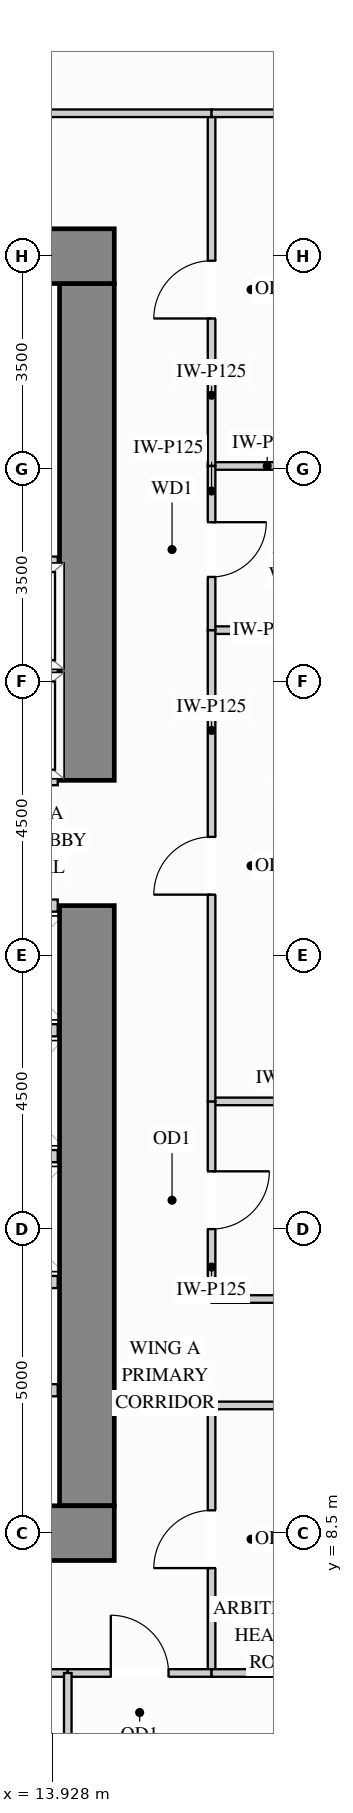
"""IFC4 building model, lengths in metres.
Left out: names, types, materials, properties, quantities, classifications, styles, units other than length and angle.
Written with IfcOpenShell. Run it as: python <this file> out.ifc"""

import sys

from ifc_helpers import new_model, si_unit, direction, frame, frame_2d, origin, place, context, subcontext, project, spatial, rectangle, extrude, source, transform, mapped, element, fill, save


model = new_model("IFC4")
c1 = context("Model", 3, precision=1e-05, world=origin(), true_north=direction((0.0, 1.0)))
c2 = subcontext(c1, "Body", "Model", "MODEL_VIEW")
j1 = project(units=[si_unit("LENGTHUNIT", "METRE"), si_unit("PLANEANGLEUNIT", "RADIAN")], contexts=[c1])
p1 = place(None, origin())
s1 = spatial("IfcSite", under=j1, at=p1, CompositionType="ELEMENT")
p2 = place(p1, origin())
s2 = spatial("IfcBuilding", under=s1, at=p2, CompositionType="ELEMENT")
p3 = place(p2, frame((0.0, 0.0, 69.3)))
s3 = spatial("IfcBuildingStorey", under=s2, at=p3, CompositionType="ELEMENT", Elevation=69.3)
m1 = source(origin(), c2, "Body", "SweptSolid", [
    extrude(rectangle(XDim=9.87, YDim=0.9, at=frame_2d((4.935, 0.0))), origin(), (0.0, 0.0, 1.0), 3.32),
])
p4 = place(p3, frame((14.5, 8.95, 0.0), z_axis=(0.0, 0.0, 1.0), x_axis=(0.0, 1.0, 0.0)))
e1 = element("IfcWall", 1, at=p4, inside=s3, PredefinedType="SHEAR", context=c2, shape_type="MappedRepresentation", body=[
    mapped(m1, transform((0.0, 0.0, 0.0), x_axis=(1.0, 0.0, 0.0), y_axis=(0.0, 1.0, 0.0), z_axis=(0.0, 0.0, 1.0))),
])
m2 = source(origin(), c2, "Body", "SweptSolid", [
    extrude(rectangle(XDim=8.17, YDim=0.9, at=frame_2d((4.085, 0.0))), origin(), (0.0, 0.0, 1.0), 3.32),
])
p5 = place(p3, frame((14.5, 20.88, 0.0), z_axis=(0.0, 0.0, 1.0), x_axis=(0.0, 1.0, 0.0)))
e2 = element("IfcWall", 2, at=p5, inside=s3, PredefinedType="SHEAR", context=c2, shape_type="MappedRepresentation", body=[
    mapped(m2, transform((0.0, 0.0, 0.0), x_axis=(1.0, 0.0, 0.0), y_axis=(0.0, 1.0, 0.0), z_axis=(0.0, 0.0, 1.0))),
])
m3 = source(origin(), c2, "Body", "SweptSolid", [
    extrude(rectangle(XDim=10.9, YDim=0.9, at=frame_2d((5.45, 0.0))), origin(), (0.0, 0.0, 1.0), 3.32),
])
for number, where, z_axis, x_axis in (
    (3, (4.05, 29.5, 0.0), (0.0, 0.0, 1.0), (1.0, 0.0, 0.0)),
    (4, (4.05, 8.5, 0.0), (0.0, 0.0, 1.0), (1.0, 0.0, 0.0)),
):
    element("IfcWall", number, at=place(p3, frame(where, z_axis=z_axis, x_axis=x_axis)), inside=s3, PredefinedType="SHEAR", context=c2, shape_type="MappedRepresentation", body=[
        mapped(m3, transform((0.0, 0.0, 0.0), x_axis=(1.0, 0.0, 0.0), y_axis=(0.0, 1.0, 0.0), z_axis=(0.0, 0.0, 1.0))),
    ])
m4 = source(origin(), c2, "Body", "SweptSolid", [
    extrude(rectangle(XDim=2.6, YDim=0.125, at=frame_2d((1.3, 0.0))), origin(), (0.0, 0.0, 1.0), 3.305),
])
p6 = place(p3, frame((16.55, 15.6, 0.0), z_axis=(0.0, 0.0, 1.0), x_axis=(1.0, 0.0, 0.0)))
e5 = element("IfcWall", 5, at=p6, inside=s3, PredefinedType="PARTITIONING", context=c2, shape_type="MappedRepresentation", body=[
    mapped(m4, transform((0.0, 0.0, 0.0), x_axis=(1.0, 0.0, 0.0), y_axis=(0.0, 1.0, 0.0), z_axis=(0.0, 0.0, 1.0))),
])
m5 = source(origin(), c2, "Body", "SweptSolid", [
    extrude(rectangle(XDim=2.598, YDim=0.125, at=frame_2d((1.299, 0.0))), origin(), (0.0, 0.0, 1.0), 3.305),
])
for number, where, z_axis, x_axis in (
    (6, (16.55, 23.35, 0.0), (0.0, 0.0, 1.0), (1.0, 0.0, 0.0)),
    (7, (16.55, 26.05, 0.0), (0.0, 0.0, 1.0), (1.0, 0.0, 0.0)),
):
    element("IfcWall", number, at=place(p3, frame(where, z_axis=z_axis, x_axis=x_axis)), inside=s3, PredefinedType="PARTITIONING", context=c2, shape_type="MappedRepresentation", body=[
        mapped(m5, transform((0.0, 0.0, 0.0), x_axis=(1.0, 0.0, 0.0), y_axis=(0.0, 1.0, 0.0), z_axis=(0.0, 0.0, 1.0))),
    ])
p7 = place(p3, frame((16.55, 12.35, 0.0), z_axis=(0.0, 0.0, 1.0), x_axis=(0.0, 1.0, 0.0)))
e8 = element("IfcWall", 8, at=p7, inside=s3, PredefinedType="PARTITIONING", context=c2, shape_type="SweptSolid", body=[
    extrude(rectangle(XDim=3.25, YDim=0.125, at=frame_2d((1.625, 0.0))), origin(), (0.0, 0.0, 1.0), 3.305),
])
p8 = place(p7, frame((1.15, 0.0, 0.0)))
e9 = element("IfcOpeningElement", 9, at=p8, cuts=e8, PredefinedType="OPENING", context=c2, shape_type="SweptSolid", body=[
    extrude(rectangle(XDim=0.95, YDim=2.15, at=frame_2d((0.475, 1.075))), frame((0.0, 0.073, 0.0), z_axis=(0.0, -1.0, 0.0), x_axis=(1.0, 0.0, 0.0)), (0.0, 0.0, 1.0), 0.145),
])
p9 = place(p3, frame((16.55, 15.6, 0.0), z_axis=(0.0, 0.0, 1.0), x_axis=(0.0, 1.0, 0.0)))
e10 = element("IfcWall", 10, at=p9, inside=s3, PredefinedType="PARTITIONING", context=c2, shape_type="SweptSolid", body=[
    extrude(rectangle(XDim=7.75, YDim=0.125, at=frame_2d((3.875, 0.0))), origin(), (0.0, 0.0, 1.0), 3.305),
])
p10 = place(p9, frame((3.4, 0.0, 0.0)))
e11 = element("IfcOpeningElement", 11, at=p10, cuts=e10, PredefinedType="OPENING", context=c2, shape_type="SweptSolid", body=[
    extrude(rectangle(XDim=0.95, YDim=2.15, at=frame_2d((0.475, 1.075))), frame((0.0, 0.073, 0.0), z_axis=(0.0, -1.0, 0.0), x_axis=(1.0, 0.0, 0.0)), (0.0, 0.0, 1.0), 0.145),
])
p11 = place(p3, frame((16.55, 26.05, 0.0), z_axis=(0.0, 0.0, 1.0), x_axis=(0.0, 1.0, 0.0)))
e12 = element("IfcWall", 12, at=p11, inside=s3, PredefinedType="PARTITIONING", context=c2, shape_type="SweptSolid", body=[
    extrude(rectangle(XDim=5.8, YDim=0.125, at=frame_2d((2.9, 0.0))), origin(), (0.0, 0.0, 1.0), 3.305),
])
p12 = place(p11, frame((2.425, 0.0, 0.0)))
e13 = element("IfcOpeningElement", 13, at=p12, cuts=e12, PredefinedType="OPENING", context=c2, shape_type="SweptSolid", body=[
    extrude(rectangle(XDim=0.95, YDim=2.15, at=frame_2d((0.475, 1.075))), frame((0.0, 0.073, 0.0), z_axis=(0.0, -1.0, 0.0), x_axis=(1.0, 0.0, 0.0)), (0.0, 0.0, 1.0), 0.145),
])
p13 = place(p3, frame((16.55, 6.2, 0.0), z_axis=(0.0, 0.0, 1.0), x_axis=(0.0, 1.0, 0.0)))
e14 = element("IfcWall", 14, at=p13, inside=s3, PredefinedType="PARTITIONING", context=c2, shape_type="SweptSolid", body=[
    extrude(rectangle(XDim=4.4, YDim=0.125, at=frame_2d((2.2, 0.0))), origin(), (0.0, 0.0, 1.0), 3.305),
])
p14 = place(p13, frame((1.725, 0.0, 0.0)))
e15 = element("IfcOpeningElement", 15, at=p14, cuts=e14, PredefinedType="OPENING", context=c2, shape_type="SweptSolid", body=[
    extrude(rectangle(XDim=0.95, YDim=2.15, at=frame_2d((0.475, 1.075))), frame((0.0, 0.073, 0.0), z_axis=(0.0, -1.0, 0.0), x_axis=(1.0, 0.0, 0.0)), (0.0, 0.0, 1.0), 0.145),
])
p15 = place(p3, frame((16.55, 23.35, 0.0), z_axis=(0.0, 0.0, 1.0), x_axis=(0.0, 1.0, 0.0)))
e16 = element("IfcWall", 16, at=p15, inside=s3, PredefinedType="PARTITIONING", context=c2, shape_type="SweptSolid", body=[
    extrude(rectangle(XDim=2.7, YDim=0.125, at=frame_2d((1.35, 0.0))), origin(), (0.0, 0.0, 1.0), 3.305),
])
p16 = place(p15, frame((0.875, 0.0, 0.0)))
e17 = element("IfcOpeningElement", 17, at=p16, cuts=e16, PredefinedType="OPENING", context=c2, shape_type="SweptSolid", body=[
    extrude(rectangle(XDim=0.9, YDim=2.15, at=frame_2d((0.45, 1.075))), frame((0.0, 0.073, 0.0), z_axis=(0.0, -1.0, 0.0), x_axis=(1.0, 0.0, 0.0)), (0.0, 0.0, 1.0), 0.145),
])
p17 = place(p3, frame((2.45, 31.85, 0.0), z_axis=(0.0, 0.0, 1.0), x_axis=(1.0, 0.0, 0.0)))
e18 = element("IfcWall", 18, at=p17, inside=s3, PredefinedType="PARTITIONING", context=c2, shape_type="SweptSolid", body=[
    extrude(rectangle(XDim=14.1, YDim=0.125, at=frame_2d((7.05, 0.0))), origin(), (0.0, 0.0, 1.0), 2.768),
])
p18 = place(p17, frame((6.575, 0.0, 0.0)))
e19 = element("IfcOpeningElement", 19, at=p18, cuts=e18, PredefinedType="OPENING", context=c2, shape_type="SweptSolid", body=[
    extrude(rectangle(XDim=0.95, YDim=2.15, at=frame_2d((0.475, 1.075))), frame((0.0, 0.073, 0.0), z_axis=(0.0, -1.0, 0.0), x_axis=(1.0, 0.0, 0.0)), (0.0, 0.0, 1.0), 0.145),
])
m6 = source(origin(), c2, "Body", "SweptSolid", [
    extrude(rectangle(XDim=2.598, YDim=0.125, at=frame_2d((1.299, 0.0))), origin(), (0.0, 0.0, 1.0), 2.768),
])
p19 = place(p3, frame((16.55, 31.85, 0.0), z_axis=(0.0, 0.0, 1.0), x_axis=(1.0, 0.0, 0.0)))
e20 = element("IfcWall", 20, at=p19, inside=s3, PredefinedType="PARTITIONING", context=c2, shape_type="MappedRepresentation", body=[
    mapped(m6, transform((0.0, 0.0, 0.0), x_axis=(1.0, 0.0, 0.0), y_axis=(0.0, 1.0, 0.0), z_axis=(0.0, 0.0, 1.0))),
])
m7 = source(origin(), c2, "Body", "SweptSolid", [
    extrude(rectangle(XDim=2.95, YDim=0.125, at=frame_2d((1.475, 0.0))), origin(), (0.0, 0.0, 1.0), 3.305),
])
for number, where, z_axis, x_axis in (
    (21, (16.55, 12.35, 0.0), (0.0, 0.0, 1.0), (1.0, 0.0, 0.0)),
    (22, (16.55, 10.6, 0.0), (0.0, 0.0, 1.0), (1.0, 0.0, 0.0)),
):
    element("IfcWall", number, at=place(p3, frame(where, z_axis=z_axis, x_axis=x_axis)), inside=s3, PredefinedType="PARTITIONING", context=c2, shape_type="MappedRepresentation", body=[
        mapped(m7, transform((0.0, 0.0, 0.0), x_axis=(1.0, 0.0, 0.0), y_axis=(0.0, 1.0, 0.0), z_axis=(0.0, 0.0, 1.0))),
    ])
p20 = place(p3, frame((10.544, 6.2, 0.0), z_axis=(0.0, 0.0, 1.0), x_axis=(1.0, 0.0, 0.0)))
e23 = element("IfcWall", 23, at=p20, inside=s3, PredefinedType="PARTITIONING", context=c2, shape_type="SweptSolid", body=[
    extrude(rectangle(XDim=3.641, YDim=0.125, at=frame_2d((1.821, 0.0))), origin(), (0.0, 0.0, 1.0), 2.768),
])
p21 = place(p20, frame((1.345, 0.0, 0.0)))
e24 = element("IfcOpeningElement", 24, at=p21, cuts=e23, PredefinedType="OPENING", context=c2, shape_type="SweptSolid", body=[
    extrude(rectangle(XDim=0.95, YDim=2.15, at=frame_2d((0.475, 1.075))), frame((0.0, 0.073, 0.0), z_axis=(0.0, -1.0, 0.0), x_axis=(1.0, 0.0, 0.0)), (0.0, 0.0, 1.0), 0.145),
])
p22 = place(p3, frame((14.185, 6.2, 0.0), z_axis=(0.0, 0.0, 1.0), x_axis=(1.0, 0.0, 0.0)))
e25 = element("IfcWall", 25, at=p22, inside=s3, PredefinedType="PARTITIONING", context=c2, shape_type="SweptSolid", body=[
    extrude(rectangle(XDim=2.365, YDim=0.125, at=frame_2d((1.183, 0.0))), origin(), (0.0, 0.0, 1.0), 2.768),
])
p23 = place(p22, frame((0.708, 0.0, 0.0)))
e26 = element("IfcOpeningElement", 26, at=p23, cuts=e25, PredefinedType="OPENING", context=c2, shape_type="SweptSolid", body=[
    extrude(rectangle(XDim=0.95, YDim=2.15, at=frame_2d((0.475, 1.075))), frame((0.0, 0.073, 0.0), z_axis=(0.0, -1.0, 0.0), x_axis=(1.0, 0.0, 0.0)), (0.0, 0.0, 1.0), 0.145),
])
p24 = place(p3, frame((16.55, 6.2, 0.0), z_axis=(0.0, 0.0, 1.0), x_axis=(1.0, 0.0, 0.0)))
e27 = element("IfcWall", 27, at=p24, inside=s3, PredefinedType="PARTITIONING", context=c2, shape_type="MappedRepresentation", body=[
    mapped(m6, transform((0.0, 0.0, 0.0), x_axis=(1.0, 0.0, 0.0), y_axis=(0.0, 1.0, 0.0), z_axis=(0.0, 0.0, 1.0))),
])
m8 = source(origin(), c2, "Body", "SweptSolid", [
    extrude(rectangle(XDim=4.94, YDim=0.125, at=frame_2d((2.47, 0.0))), origin(), (0.0, 0.0, 1.0), 3.305),
])
p25 = place(p3, frame((14.185, 1.26, 0.0), z_axis=(0.0, 0.0, 1.0), x_axis=(0.0, 1.0, 0.0)))
e28 = element("IfcWall", 28, at=p25, inside=s3, PredefinedType="PARTITIONING", context=c2, shape_type="MappedRepresentation", body=[
    mapped(m8, transform((0.0, 0.0, 0.0), x_axis=(1.0, 0.0, 0.0), y_axis=(0.0, 1.0, 0.0), z_axis=(0.0, 0.0, 1.0))),
])
m9 = source(origin(), c2, "Body", "SweptSolid", [
    extrude(rectangle(XDim=1.6, YDim=0.2, at=frame_2d((0.8, 0.0))), origin(), (0.0, 0.0, 1.0), 3.305),
])
p26 = place(p3, frame((12.42, 10.85, 0.0), z_axis=(0.0, 0.0, 1.0), x_axis=(1.0, 0.0, 0.0)))
e29 = element("IfcWall", 29, at=p26, inside=s3, PredefinedType="PARTITIONING", context=c2, shape_type="MappedRepresentation", body=[
    mapped(m9, transform((0.0, 0.0, 0.0), x_axis=(1.0, 0.0, 0.0), y_axis=(0.0, 1.0, 0.0), z_axis=(0.0, 0.0, 1.0))),
])
m10 = source(origin(), c2, "Body", "SweptSolid", [
    extrude(rectangle(XDim=2.19, YDim=0.2, at=frame_2d((1.095, 0.0))), origin(), (0.0, 0.0, 1.0), 3.305),
])
for number, where, z_axis, x_axis in (
    (30, (11.83, 22.66, 0.0), (0.0, 0.0, 1.0), (1.0, 0.0, 0.0)),
    (31, (11.83, 20.9, 0.0), (0.0, 0.0, 1.0), (1.0, 0.0, 0.0)),
    (32, (11.83, 24.46, 0.0), (0.0, 0.0, 1.0), (1.0, 0.0, 0.0)),
):
    element("IfcWall", number, at=place(p3, frame(where, z_axis=z_axis, x_axis=x_axis)), inside=s3, PredefinedType="PARTITIONING", context=c2, shape_type="MappedRepresentation", body=[
        mapped(m10, transform((0.0, 0.0, 0.0), x_axis=(1.0, 0.0, 0.0), y_axis=(0.0, 1.0, 0.0), z_axis=(0.0, 0.0, 1.0))),
    ])
m11 = source(origin(), c2, "Body", "SweptSolid", [
    extrude(rectangle(XDim=1.79, YDim=0.2, at=frame_2d((0.895, 0.0))), origin(), (0.0, 0.0, 1.0), 3.305),
])
for number, where, z_axis, x_axis in (
    (33, (12.23, 14.7, 0.0), (0.0, 0.0, 1.0), (1.0, 0.0, 0.0)),
    (34, (12.23, 12.63, 0.0), (0.0, 0.0, 1.0), (1.0, 0.0, 0.0)),
    (35, (12.23, 16.77, 0.0), (0.0, 0.0, 1.0), (1.0, 0.0, 0.0)),
    (36, (12.23, 18.82, 0.0), (0.0, 0.0, 1.0), (1.0, 0.0, 0.0)),
):
    element("IfcWall", number, at=place(p3, frame(where, z_axis=z_axis, x_axis=x_axis)), inside=s3, PredefinedType="PARTITIONING", context=c2, shape_type="MappedRepresentation", body=[
        mapped(m11, transform((0.0, 0.0, 0.0), x_axis=(1.0, 0.0, 0.0), y_axis=(0.0, 1.0, 0.0), z_axis=(0.0, 0.0, 1.0))),
    ])
m12 = source(origin(), c2, "Body", "SweptSolid", [
    extrude(rectangle(XDim=0.95, YDim=2.15, at=frame_2d((0.475, 1.075))), frame((0.0, 0.025, 0.0), z_axis=(0.0, -1.0, 0.0), x_axis=(1.0, 0.0, 0.0)), (0.0, 0.0, 1.0), 0.05),
])
p27 = place(p14, origin())
e37 = element("IfcDoor", 37, at=p27, inside=s3, OperationType="SINGLE_SWING_LEFT", PredefinedType="DOOR", context=c2, shape_type="MappedRepresentation", body=[
    mapped(m12, transform((0.0, 0.0, 0.0), x_axis=(1.0, 0.0, 0.0), y_axis=(0.0, 1.0, 0.0), z_axis=(0.0, 0.0, 1.0))),
])
fill(e15, e37)
p28 = place(p8, origin())
e38 = element("IfcDoor", 38, at=p28, inside=s3, OperationType="SINGLE_SWING_RIGHT", PredefinedType="DOOR", context=c2, shape_type="MappedRepresentation", body=[
    mapped(m12, transform((0.0, 0.0, 0.0), x_axis=(1.0, 0.0, 0.0), y_axis=(0.0, 1.0, 0.0), z_axis=(0.0, 0.0, 1.0))),
])
fill(e9, e38)
p29 = place(p10, origin())
e39 = element("IfcDoor", 39, at=p29, inside=s3, OperationType="SINGLE_SWING_LEFT", PredefinedType="DOOR", context=c2, shape_type="MappedRepresentation", body=[
    mapped(m12, transform((0.0, 0.0, 0.0), x_axis=(1.0, 0.0, 0.0), y_axis=(0.0, 1.0, 0.0), z_axis=(0.0, 0.0, 1.0))),
])
fill(e11, e39)
p30 = place(p12, origin())
e40 = element("IfcDoor", 40, at=p30, inside=s3, OperationType="SINGLE_SWING_LEFT", PredefinedType="DOOR", context=c2, shape_type="MappedRepresentation", body=[
    mapped(m12, transform((0.0, 0.0, 0.0), x_axis=(1.0, 0.0, 0.0), y_axis=(0.0, 1.0, 0.0), z_axis=(0.0, 0.0, 1.0))),
])
fill(e13, e40)
p31 = place(p23, origin())
e41 = element("IfcDoor", 41, at=p31, inside=s3, OperationType="SINGLE_SWING_LEFT", PredefinedType="DOOR", context=c2, shape_type="MappedRepresentation", body=[
    mapped(m12, transform((0.0, 0.0, 0.0), x_axis=(1.0, 0.0, 0.0), y_axis=(0.0, 1.0, 0.0), z_axis=(0.0, 0.0, 1.0))),
])
fill(e26, e41)
m13 = source(origin(), c2, "Body", "SweptSolid", [
    extrude(rectangle(XDim=0.9, YDim=2.15, at=frame_2d((0.45, 1.075))), frame((0.0, 0.025, 0.0), z_axis=(0.0, -1.0, 0.0), x_axis=(1.0, 0.0, 0.0)), (0.0, 0.0, 1.0), 0.05),
])
p32 = place(p16, origin())
e42 = element("IfcDoor", 42, at=p32, inside=s3, OperationType="SINGLE_SWING_RIGHT", PredefinedType="DOOR", context=c2, shape_type="MappedRepresentation", body=[
    mapped(m13, transform((0.0, 0.0, 0.0), x_axis=(1.0, 0.0, 0.0), y_axis=(0.0, 1.0, 0.0), z_axis=(0.0, 0.0, 1.0))),
])
fill(e17, e42)
save(model, sys.argv[1])
